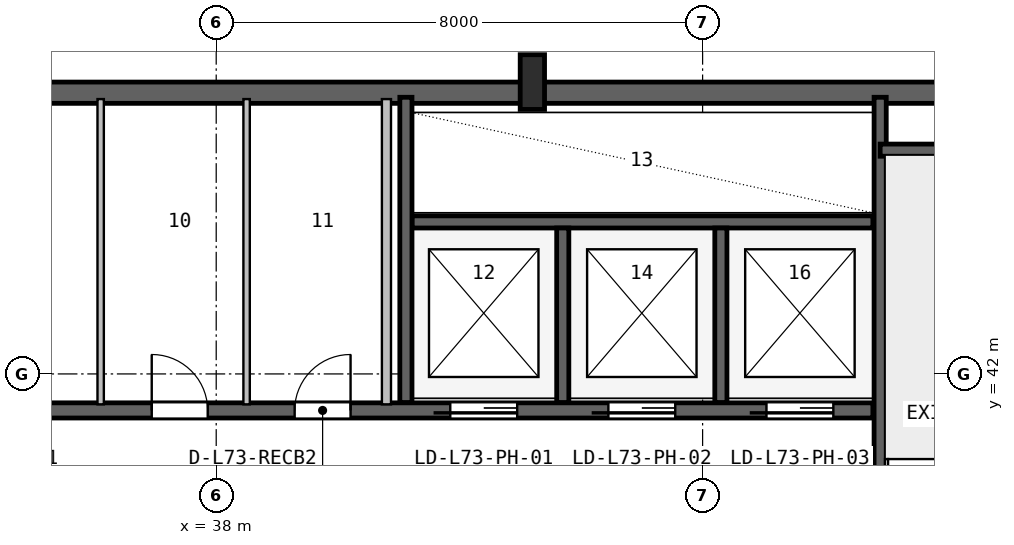
"""IFC4 building model, lengths in metres.
Left out: names, types, materials, properties, quantities, classifications, styles, units other than length and angle.
Written with IfcOpenShell. Run it as: python <this file> out.ifc"""

import sys

from ifc_helpers import new_model, si_unit, direction, frame, frame_2d, origin, origin_2d, place, context, subcontext, project, spatial, rectangle, i_section, extrude, source, transform, mapped, element, fill, save


model = new_model("IFC4")
c1 = context("Model", 3, precision=1e-05, world=origin(), true_north=direction((0.0, 1.0)))
c2 = subcontext(c1, "Body", "Model", "MODEL_VIEW")
j1 = project(units=[si_unit("LENGTHUNIT", "METRE"), si_unit("PLANEANGLEUNIT", "RADIAN")], contexts=[c1])
p1 = place(None, origin())
s1 = spatial("IfcSite", under=j1, at=p1, CompositionType="ELEMENT")
p2 = place(p1, origin())
s2 = spatial("IfcBuilding", under=s1, at=p2, CompositionType="ELEMENT")
p3 = place(p2, frame((0.0, 0.0, 292.6)))
s3 = spatial("IfcBuildingStorey", under=s2, at=p3, CompositionType="ELEMENT", Elevation=292.6)
p4 = place(p3, frame((15.325, 46.625, 0.0), z_axis=(0.0, 0.0, 1.0), x_axis=(1.0, 0.0, 0.0)))
e1 = element("IfcWall", 1, at=p4, inside=s3, PredefinedType="SHEAR", context=c2, shape_type="SweptSolid", body=[
    extrude(rectangle(XDim=37.35, YDim=0.35, at=frame_2d((18.675, 0.0))), origin(), (0.0, 0.0, 1.0), 3.55),
])
m1 = source(origin(), c2, "Body", "SweptSolid", [
    extrude(i_section(OverallWidth=0.4, OverallDepth=0.9, WebThickness=0.016, FlangeThickness=0.028, FilletRadius=0.016, at=origin_2d()), origin(), (0.0, 0.0, 1.0), 3.8),
])
p5 = place(p3, frame((43.2, 46.8, 0.0), z_axis=(0.0, 0.0, 1.0), x_axis=(1.0, 0.0, 0.0)))
e2 = element("IfcColumn", 2, at=p5, inside=s3, PredefinedType="COLUMN", context=c2, shape_type="MappedRepresentation", body=[
    mapped(m1, transform((0.0, 0.0, 0.0), x_axis=(1.0, 0.0, 0.0), y_axis=(0.0, 1.0, 0.0), z_axis=(0.0, 0.0, 1.0), scale=1.0)),
])
p6 = place(p3, frame((48.92, 36.05, 0.0), z_axis=(0.0, 0.0, 1.0), x_axis=(0.0, 1.0, 0.0)))
e3 = element("IfcWall", 3, at=p6, inside=s3, PredefinedType="SHEAR", context=c2, shape_type="SweptSolid", body=[
    extrude(rectangle(XDim=10.5, YDim=0.2, at=frame_2d((5.25, 0.0))), origin(), (0.0, 0.0, 1.0), 3.55),
])
p7 = place(p3, frame((48.92, 45.68, 0.0), z_axis=(0.0, 0.0, 1.0), x_axis=(1.0, 0.0, 0.0)))
e4 = element("IfcWall", 4, at=p7, inside=s3, PredefinedType="SHEAR", context=c2, shape_type="SweptSolid", body=[
    extrude(rectangle(XDim=3.18, YDim=0.2, at=frame_2d((1.59, 0.0))), origin(), (0.0, 0.0, 1.0), 3.55),
])
p8 = place(p3, frame((24.98, 41.4, 0.0), z_axis=(0.0, 0.0, 1.0), x_axis=(1.0, 0.0, 0.0)))
e5 = element("IfcWall", 5, at=p8, inside=s3, PredefinedType="SHEAR", context=c2, shape_type="SweptSolid", body=[
    extrude(rectangle(XDim=23.82, YDim=0.25, at=frame_2d((11.91, 0.0))), origin(), (0.0, 0.0, 1.0), 3.55),
])
p9 = place(p8, frame((16.87, 0.0, 0.0)))
e6 = element("IfcOpeningElement", 6, at=p9, cuts=e5, PredefinedType="OPENING", context=c2, shape_type="SweptSolid", body=[
    extrude(rectangle(XDim=1.1, YDim=2.18, at=frame_2d((0.55, 1.09))), frame((0.0, 0.135, 0.0), z_axis=(0.0, -1.0, 0.0), x_axis=(1.0, 0.0, 0.0)), (0.0, 0.0, 1.0), 0.27),
])
p10 = place(p8, frame((19.47, 0.0, 0.0)))
e7 = element("IfcOpeningElement", 7, at=p10, cuts=e5, PredefinedType="OPENING", context=c2, shape_type="SweptSolid", body=[
    extrude(rectangle(XDim=1.1, YDim=2.18, at=frame_2d((0.55, 1.09))), frame((0.0, 0.135, 0.0), z_axis=(0.0, -1.0, 0.0), x_axis=(1.0, 0.0, 0.0)), (0.0, 0.0, 1.0), 0.27),
])
p11 = place(p8, frame((22.07, 0.0, 0.0)))
e8 = element("IfcOpeningElement", 8, at=p11, cuts=e5, PredefinedType="OPENING", context=c2, shape_type="SweptSolid", body=[
    extrude(rectangle(XDim=1.1, YDim=2.18, at=frame_2d((0.55, 1.09))), frame((0.0, 0.135, 0.0), z_axis=(0.0, -1.0, 0.0), x_axis=(1.0, 0.0, 0.0)), (0.0, 0.0, 1.0), 0.27),
])
p12 = place(p8, frame((1.81, 0.0, 0.0)))
e9 = element("IfcOpeningElement", 9, at=p12, cuts=e5, PredefinedType="OPENING", context=c2, shape_type="SweptSolid", body=[
    extrude(rectangle(XDim=0.92, YDim=2.08, at=frame_2d((0.46, 1.04))), frame((0.0, 0.135, 0.0), z_axis=(0.0, -1.0, 0.0), x_axis=(1.0, 0.0, 0.0)), (0.0, 0.0, 1.0), 0.27),
])
p13 = place(p8, frame((5.71, 0.0, 0.0)))
e10 = element("IfcOpeningElement", 10, at=p13, cuts=e5, PredefinedType="OPENING", context=c2, shape_type="SweptSolid", body=[
    extrude(rectangle(XDim=0.92, YDim=2.08, at=frame_2d((0.46, 1.04))), frame((0.0, 0.135, 0.0), z_axis=(0.0, -1.0, 0.0), x_axis=(1.0, 0.0, 0.0)), (0.0, 0.0, 1.0), 0.27),
])
p14 = place(p8, frame((9.21, 0.0, 0.0)))
e11 = element("IfcOpeningElement", 11, at=p14, cuts=e5, PredefinedType="OPENING", context=c2, shape_type="SweptSolid", body=[
    extrude(rectangle(XDim=0.92, YDim=2.08, at=frame_2d((0.46, 1.04))), frame((0.0, 0.135, 0.0), z_axis=(0.0, -1.0, 0.0), x_axis=(1.0, 0.0, 0.0)), (0.0, 0.0, 1.0), 0.27),
])
p15 = place(p8, frame((11.96, 0.0, 0.0)))
e12 = element("IfcOpeningElement", 12, at=p15, cuts=e5, PredefinedType="OPENING", context=c2, shape_type="SweptSolid", body=[
    extrude(rectangle(XDim=0.92, YDim=2.08, at=frame_2d((0.46, 1.04))), frame((0.0, 0.135, 0.0), z_axis=(0.0, -1.0, 0.0), x_axis=(1.0, 0.0, 0.0)), (0.0, 0.0, 1.0), 0.27),
])
p16 = place(p8, frame((14.31, 0.0, 0.0)))
e13 = element("IfcOpeningElement", 13, at=p16, cuts=e5, PredefinedType="OPENING", context=c2, shape_type="SweptSolid", body=[
    extrude(rectangle(XDim=0.92, YDim=2.08, at=frame_2d((0.46, 1.04))), frame((0.0, 0.135, 0.0), z_axis=(0.0, -1.0, 0.0), x_axis=(1.0, 0.0, 0.0)), (0.0, 0.0, 1.0), 0.27),
])
p17 = place(p3, frame((41.22, 44.5, 0.0), z_axis=(0.0, 0.0, 1.0), x_axis=(1.0, 0.0, 0.0)))
e14 = element("IfcWall", 14, at=p17, inside=s3, PredefinedType="SHEAR", context=c2, shape_type="SweptSolid", body=[
    extrude(rectangle(XDim=7.58, YDim=0.2, at=frame_2d((3.79, 0.0))), origin(), (0.0, 0.0, 1.0), 3.55),
])
p18 = place(p3, frame((41.12, 41.53, 0.0), z_axis=(0.0, 0.0, 1.0), x_axis=(0.0, 1.0, 0.0)))
e15 = element("IfcWall", 15, at=p18, inside=s3, PredefinedType="SHEAR", context=c2, shape_type="SweptSolid", body=[
    extrude(rectangle(XDim=5.02, YDim=0.2, at=frame_2d((2.51, 0.0))), origin(), (0.0, 0.0, 1.0), 3.55),
])
for number, where, z_axis, x_axis in (
    (16, (43.7, 41.53, 0.0), (0.0, 0.0, 1.0), (0.0, 1.0, 0.0)),
    (17, (46.3, 41.53, 0.0), (0.0, 0.0, 1.0), (0.0, 1.0, 0.0)),
):
    element("IfcWall", number, at=place(p3, frame(where, z_axis=z_axis, x_axis=x_axis)), inside=s3, PredefinedType="SHEAR", context=c2, shape_type="SweptSolid", body=[
        extrude(rectangle(XDim=2.87, YDim=0.2, at=frame_2d((1.435, 0.0))), origin(), (0.0, 0.0, 1.0), 3.55),
    ])
for number, where, z_axis, x_axis in (
    (18, (36.1, 41.5, 0.0), (0.0, 0.0, 1.0), (0.0, 1.0, 0.0)),
    (19, (38.5, 41.5, 0.0), (0.0, 0.0, 1.0), (0.0, 1.0, 0.0)),
):
    element("IfcWall", number, at=place(p3, frame(where, z_axis=z_axis, x_axis=x_axis)), inside=s3, PredefinedType="PARTITIONING", context=c2, shape_type="SweptSolid", body=[
        extrude(rectangle(XDim=5.02, YDim=0.105, at=frame_2d((2.51, 0.0))), origin(), (0.0, 0.0, 1.0), 3.53),
    ])
p19 = place(p3, frame((40.8, 41.5, 0.0), z_axis=(0.0, 0.0, 1.0), x_axis=(0.0, 1.0, 0.0)))
e20 = element("IfcWall", 20, at=p19, inside=s3, PredefinedType="PARTITIONING", context=c2, shape_type="SweptSolid", body=[
    extrude(rectangle(XDim=5.02, YDim=0.15, at=frame_2d((2.51, 0.0))), origin(), (0.0, 0.0, 1.0), 3.53),
])
m2 = source(origin(), c2, "Body", "SweptSolid", [
    extrude(rectangle(XDim=1.1, YDim=2.18, at=frame_2d((0.55, 1.09))), frame((0.0, 0.025, 0.0), z_axis=(0.0, -1.0, 0.0), x_axis=(1.0, 0.0, 0.0)), (0.0, 0.0, 1.0), 0.05),
])
p20 = place(p9, frame((1.1, 0.0, 0.0), z_axis=(0.0, 0.0, 1.0), x_axis=(-1.0, 0.0, 0.0)))
e21 = element("IfcDoor", 21, at=p20, inside=s3, OperationType="SLIDING_TO_LEFT", PredefinedType="DOOR", context=c2, shape_type="MappedRepresentation", body=[
    mapped(m2, transform((0.0, 0.0, 0.0), x_axis=(1.0, 0.0, 0.0), y_axis=(0.0, 1.0, 0.0), z_axis=(0.0, 0.0, 1.0), scale=1.0)),
])
fill(e6, e21)
p21 = place(p10, frame((1.1, 0.0, 0.0), z_axis=(0.0, 0.0, 1.0), x_axis=(-1.0, 0.0, 0.0)))
e22 = element("IfcDoor", 22, at=p21, inside=s3, OperationType="SLIDING_TO_LEFT", PredefinedType="DOOR", context=c2, shape_type="MappedRepresentation", body=[
    mapped(m2, transform((0.0, 0.0, 0.0), x_axis=(1.0, 0.0, 0.0), y_axis=(0.0, 1.0, 0.0), z_axis=(0.0, 0.0, 1.0), scale=1.0)),
])
fill(e7, e22)
p22 = place(p11, frame((1.1, 0.0, 0.0), z_axis=(0.0, 0.0, 1.0), x_axis=(-1.0, 0.0, 0.0)))
e23 = element("IfcDoor", 23, at=p22, inside=s3, OperationType="SLIDING_TO_LEFT", PredefinedType="DOOR", context=c2, shape_type="MappedRepresentation", body=[
    mapped(m2, transform((0.0, 0.0, 0.0), x_axis=(1.0, 0.0, 0.0), y_axis=(0.0, 1.0, 0.0), z_axis=(0.0, 0.0, 1.0), scale=1.0)),
])
fill(e8, e23)
m3 = source(origin(), c2, "Body", "SweptSolid", [
    extrude(rectangle(XDim=0.92, YDim=2.08, at=frame_2d((0.46, 1.04))), frame((0.0, 0.025, 0.0), z_axis=(0.0, -1.0, 0.0), x_axis=(1.0, 0.0, 0.0)), (0.0, 0.0, 1.0), 0.05),
])
p23 = place(p15, origin())
e24 = element("IfcDoor", 24, at=p23, inside=s3, OperationType="SINGLE_SWING_LEFT", PredefinedType="DOOR", context=c2, shape_type="MappedRepresentation", body=[
    mapped(m3, transform((0.0, 0.0, 0.0), x_axis=(1.0, 0.0, 0.0), y_axis=(0.0, 1.0, 0.0), z_axis=(0.0, 0.0, 1.0), scale=1.0)),
])
fill(e12, e24)
p24 = place(p16, origin())
e25 = element("IfcDoor", 25, at=p24, inside=s3, OperationType="SINGLE_SWING_RIGHT", PredefinedType="DOOR", context=c2, shape_type="MappedRepresentation", body=[
    mapped(m3, transform((0.0, 0.0, 0.0), x_axis=(1.0, 0.0, 0.0), y_axis=(0.0, 1.0, 0.0), z_axis=(0.0, 0.0, 1.0), scale=1.0)),
])
fill(e13, e25)
save(model, sys.argv[1])
